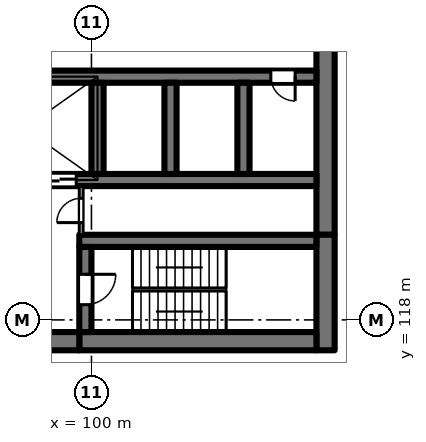
"""IFC4 building model, lengths in metres.
Left out: names, types, materials, properties, quantities, classifications, styles, units other than length and angle.
Written with IfcOpenShell. Run it as: python <this file> out.ifc"""

import sys

from ifc_helpers import new_model, si_unit, direction, frame, frame_2d, origin, place, context, subcontext, project, spatial, rectangle, extrude, element, fill, save


model = new_model("IFC4")
c1 = context("Model", 3, precision=1e-05, world=origin(), true_north=direction((0.0, 1.0)))
c2 = subcontext(c1, "Body", "Model", "MODEL_VIEW")
j1 = project(units=[si_unit("LENGTHUNIT", "METRE"), si_unit("PLANEANGLEUNIT", "RADIAN")], contexts=[c1])
p1 = place(None, origin())
s1 = spatial("IfcSite", under=j1, at=p1, CompositionType="ELEMENT")
p2 = place(p1, origin())
s2 = spatial("IfcBuilding", under=s1, at=p2, CompositionType="ELEMENT")
p3 = place(p2, frame((0.0, 0.0, 81.0)))
s3 = spatial("IfcBuildingStorey", under=s2, at=p3, CompositionType="ELEMENT", Elevation=81.0)
p4 = place(p3, frame((107.7, 135.2, 0.0), z_axis=(0.0, 0.0, 1.0), x_axis=(0.0, -1.0, 0.0)))
e1 = element("IfcWall", 1, at=p4, inside=s3, PredefinedType="SHEAR", context=c2, shape_type="SweptSolid", body=[
    extrude(rectangle(XDim=14.4, YDim=0.6, at=frame_2d((7.2, 0.0))), origin(), (0.0, 0.0, 1.0), 4.0),
])
p5 = place(p3, frame((107.7, 120.8, 0.0), z_axis=(0.0, 0.0, 1.0), x_axis=(0.0, -1.0, 0.0)))
e2 = element("IfcWall", 2, at=p5, inside=s3, PredefinedType="SHEAR", context=c2, shape_type="SweptSolid", body=[
    extrude(rectangle(XDim=3.8, YDim=0.6, at=frame_2d((1.9, 0.0))), origin(), (0.0, 0.0, 1.0), 4.0),
])
p6 = place(p3, frame((107.4, 117.3, 0.0), z_axis=(0.0, 0.0, 1.0), x_axis=(-1.0, 0.0, 0.0)))
e3 = element("IfcWall", 3, at=p6, inside=s3, PredefinedType="SHEAR", context=c2, shape_type="SweptSolid", body=[
    extrude(rectangle(XDim=7.8, YDim=0.6, at=frame_2d((3.9, 0.0))), origin(), (0.0, 0.0, 1.0), 4.0),
])
p7 = place(p3, frame((99.6, 117.3, 0.0), z_axis=(0.0, 0.0, 1.0), x_axis=(-1.0, 0.0, 0.0)))
e4 = element("IfcWall", 4, at=p7, inside=s3, PredefinedType="SHEAR", context=c2, shape_type="SweptSolid", body=[
    extrude(rectangle(XDim=8.925, YDim=0.6, at=frame_2d((4.462, 0.0))), origin(), (0.0, 0.0, 1.0), 4.0),
])
p8 = place(p3, frame((107.4, 120.6, 0.0), z_axis=(0.0, 0.0, 1.0), x_axis=(-1.0, 0.0, 0.0)))
e5 = element("IfcWall", 5, at=p8, inside=s3, PredefinedType="SHEAR", context=c2, shape_type="SweptSolid", body=[
    extrude(rectangle(XDim=7.8, YDim=0.4, at=frame_2d((3.9, 0.0))), origin(), (0.0, 0.0, 1.0), 4.0),
])
p9 = place(p3, frame((99.8, 120.4, 0.0), z_axis=(0.0, 0.0, 1.0), x_axis=(0.0, -1.0, 0.0)))
e6 = element("IfcWall", 6, at=p9, inside=s3, PredefinedType="SHEAR", context=c2, shape_type="SweptSolid", body=[
    extrude(rectangle(XDim=2.8, YDim=0.4, at=frame_2d((1.4, 0.0))), origin(), (0.0, 0.0, 1.0), 4.0),
])
p10 = place(p9, frame((0.9, 0.0, 0.0)))
e7 = element("IfcOpeningElement", 7, at=p10, cuts=e6, PredefinedType="OPENING", context=c2, shape_type="SweptSolid", body=[
    extrude(rectangle(XDim=1.0, YDim=2.1, at=frame_2d((0.5, 1.05))), frame((0.0, 0.21, 0.0), z_axis=(0.0, -1.0, 0.0), x_axis=(1.0, 0.0, 0.0)), (0.0, 0.0, 1.0), 0.42),
])
p11 = place(p3, frame((107.4, 126.0, 0.0), z_axis=(0.0, 0.0, 1.0), x_axis=(-1.0, 0.0, 0.0)))
e8 = element("IfcWall", 8, at=p11, inside=s3, PredefinedType="SHEAR", context=c2, shape_type="SweptSolid", body=[
    extrude(rectangle(XDim=12.2, YDim=0.4, at=frame_2d((6.1, 0.0))), origin(), (0.0, 0.0, 1.0), 4.0),
])
p12 = place(p11, frame((10.25, 0.0, 0.0)))
e9 = element("IfcOpeningElement", 9, at=p12, cuts=e8, PredefinedType="OPENING", context=c2, shape_type="SweptSolid", body=[
    extrude(rectangle(XDim=1.1, YDim=2.1, at=frame_2d((0.55, 1.05))), frame((0.0, 0.21, 0.0), z_axis=(0.0, -1.0, 0.0), x_axis=(1.0, 0.0, 0.0)), (0.0, 0.0, 1.0), 0.42),
])
p13 = place(p11, frame((0.7, 0.0, 0.0)))
e10 = element("IfcOpeningElement", 10, at=p13, cuts=e8, PredefinedType="OPENING", context=c2, shape_type="SweptSolid", body=[
    extrude(rectangle(XDim=0.8, YDim=2.1, at=frame_2d((0.4, 1.05))), frame((0.0, 0.21, 0.0), z_axis=(0.0, -1.0, 0.0), x_axis=(1.0, 0.0, 0.0)), (0.0, 0.0, 1.0), 0.42),
])
p14 = place(p3, frame((107.4, 122.6, 0.0), z_axis=(0.0, 0.0, 1.0), x_axis=(-1.0, 0.0, 0.0)))
e11 = element("IfcWall", 11, at=p14, inside=s3, PredefinedType="SHEAR", context=c2, shape_type="SweptSolid", body=[
    extrude(rectangle(XDim=12.2, YDim=0.4, at=frame_2d((6.1, 0.0))), origin(), (0.0, 0.0, 1.0), 4.0),
])
p15 = place(p14, frame((7.9, 0.0, 0.0)))
e12 = element("IfcOpeningElement", 12, at=p15, cuts=e11, PredefinedType="OPENING", context=c2, shape_type="SweptSolid", body=[
    extrude(rectangle(XDim=1.1, YDim=2.1, at=frame_2d((0.55, 1.05))), frame((0.0, 0.21, 0.0), z_axis=(0.0, -1.0, 0.0), x_axis=(1.0, 0.0, 0.0)), (0.0, 0.0, 1.0), 0.42),
])
for number, where, z_axis, x_axis in (
    (13, (105.0, 125.8, 0.0), (0.0, 0.0, 1.0), (0.0, -1.0, 0.0)),
    (14, (102.6, 125.8, 0.0), (0.0, 0.0, 1.0), (0.0, -1.0, 0.0)),
    (15, (100.2, 125.8, 0.0), (0.0, 0.0, 1.0), (0.0, -1.0, 0.0)),
):
    element("IfcWall", number, at=place(p3, frame(where, z_axis=z_axis, x_axis=x_axis)), inside=s3, PredefinedType="SHEAR", context=c2, shape_type="SweptSolid", body=[
        extrude(rectangle(XDim=3.0, YDim=0.4, at=frame_2d((1.5, 0.0))), origin(), (0.0, 0.0, 1.0), 4.0),
    ])
p16 = place(p3, frame((99.663, 120.8, 0.0), z_axis=(0.0, 0.0, 1.0), x_axis=(0.0, 1.0, 0.0)))
e16 = element("IfcWall", 16, at=p16, inside=s3, PredefinedType="PARTITIONING", context=c2, shape_type="SweptSolid", body=[
    extrude(rectangle(XDim=1.6, YDim=0.125, at=frame_2d((0.8, 0.0))), origin(), (0.0, 0.0, 1.0), 3.625),
])
p17 = place(p16, frame((0.4, 0.0, 0.0)))
e17 = element("IfcOpeningElement", 17, at=p17, cuts=e16, PredefinedType="OPENING", context=c2, shape_type="SweptSolid", body=[
    extrude(rectangle(XDim=0.8, YDim=2.1, at=frame_2d((0.4, 1.05))), frame((0.0, 0.073, 0.0), z_axis=(0.0, -1.0, 0.0), x_axis=(1.0, 0.0, 0.0)), (0.0, 0.0, 1.0), 0.145),
])
p18 = place(p13, origin())
e18 = element("IfcDoor", 18, at=p18, inside=s3, OperationType="SINGLE_SWING_LEFT", PredefinedType="DOOR", context=c2, shape_type="SweptSolid", body=[
    extrude(rectangle(XDim=0.8, YDim=2.1, at=frame_2d((0.4, 1.05))), frame((0.0, 0.025, 0.0), z_axis=(0.0, -1.0, 0.0), x_axis=(1.0, 0.0, 0.0)), (0.0, 0.0, 1.0), 0.05),
])
fill(e10, e18)
p19 = place(p10, origin())
e19 = element("IfcDoor", 19, at=p19, inside=s3, OperationType="SINGLE_SWING_LEFT", PredefinedType="DOOR", context=c2, shape_type="SweptSolid", body=[
    extrude(rectangle(XDim=1.0, YDim=2.1, at=frame_2d((0.5, 1.05))), frame((0.0, 0.025, 0.0), z_axis=(0.0, -1.0, 0.0), x_axis=(1.0, 0.0, 0.0)), (0.0, 0.0, 1.0), 0.05),
])
fill(e7, e19)
p20 = place(p17, origin())
e20 = element("IfcDoor", 20, at=p20, inside=s3, OperationType="SINGLE_SWING_RIGHT", PredefinedType="DOOR", context=c2, shape_type="SweptSolid", body=[
    extrude(rectangle(XDim=0.8, YDim=2.1, at=frame_2d((0.4, 1.05))), frame((0.0, 0.025, 0.0), z_axis=(0.0, -1.0, 0.0), x_axis=(1.0, 0.0, 0.0)), (0.0, 0.0, 1.0), 0.05),
])
fill(e17, e20)
p21 = place(p15, origin())
e21 = element("IfcDoor", 21, at=p21, inside=s3, OperationType="DOUBLE_DOOR_SLIDING", PredefinedType="DOOR", context=c2, shape_type="SweptSolid", body=[
    extrude(rectangle(XDim=1.1, YDim=2.1, at=frame_2d((0.55, 1.05))), frame((0.0, 0.025, 0.0), z_axis=(0.0, -1.0, 0.0), x_axis=(1.0, 0.0, 0.0)), (0.0, 0.0, 1.0), 0.05),
])
fill(e12, e21)
save(model, sys.argv[1])
